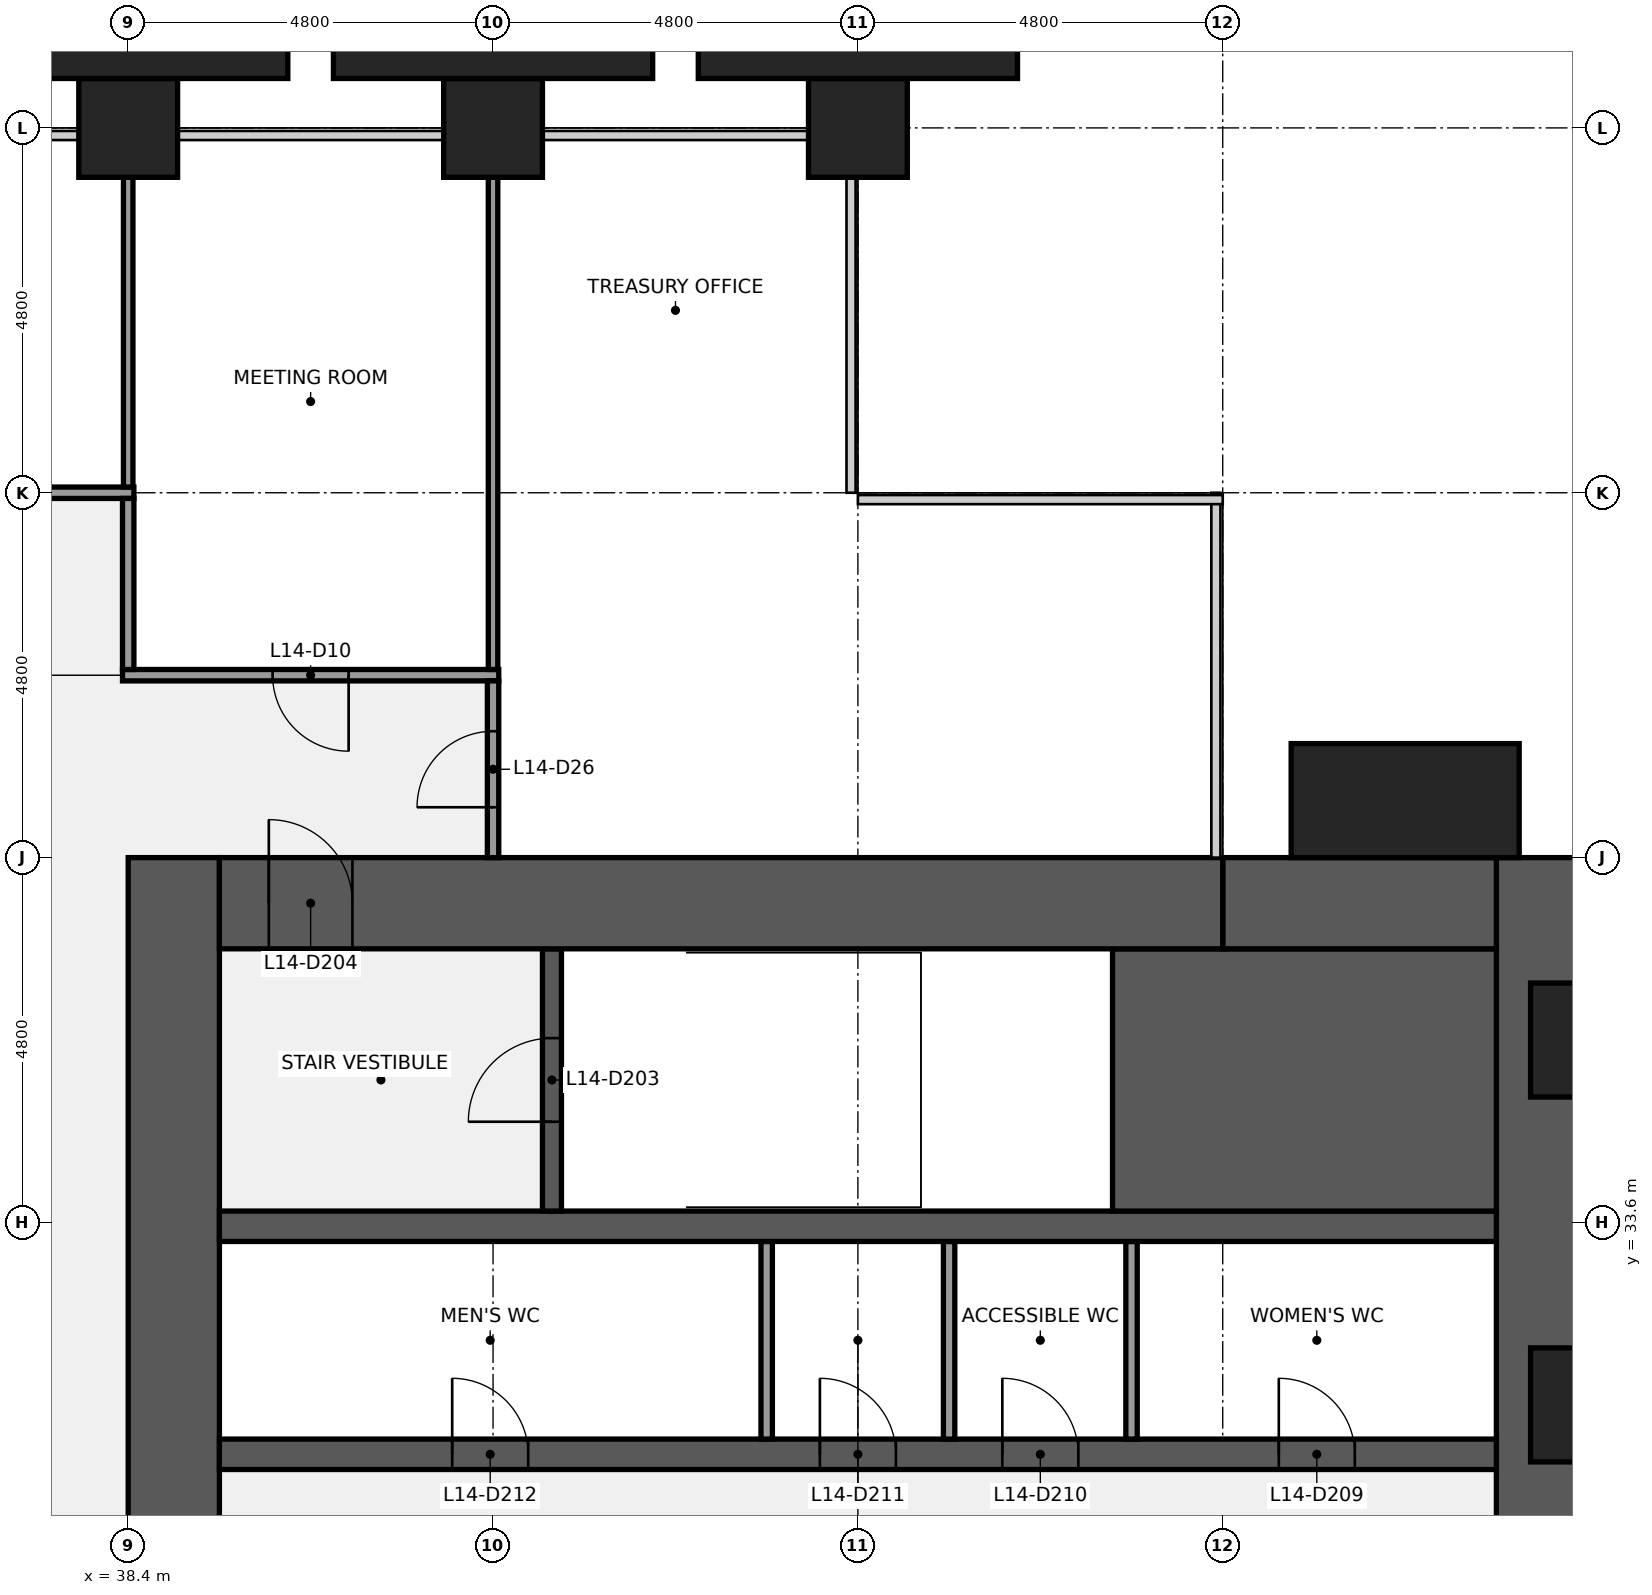
"""IFC4 building model, lengths in metres.
Left out: names, types, materials, properties, quantities, classifications, styles, units other than length and angle.
Written with IfcOpenShell. Run it as: python <this file> out.ifc"""

import sys

from ifc_helpers import new_model, si_unit, direction, frame, frame_2d, origin, origin_2d, place, context, subcontext, project, spatial, rectangle, extrude, element, fill, save


model = new_model("IFC4")
c1 = context("Model", 3, precision=1e-05, world=origin(), true_north=direction((0.0, 1.0)))
c2 = subcontext(c1, "Body", "Model", "MODEL_VIEW")
j1 = project(units=[si_unit("LENGTHUNIT", "METRE"), si_unit("PLANEANGLEUNIT", "RADIAN")], contexts=[c1])
p1 = place(None, origin())
s1 = spatial("IfcSite", under=j1, at=p1, CompositionType="ELEMENT")
p2 = place(p1, origin())
s2 = spatial("IfcBuilding", under=s1, at=p2, CompositionType="ELEMENT")
p3 = place(p2, frame((0.0, 0.0, 67.0)))
s3 = spatial("IfcBuildingStorey", under=s2, at=p3, CompositionType="ELEMENT", Elevation=67.0)
for number, where, z_axis, x_axis in (
    (1, (38.4, 48.0, 0.0), (0.0, 0.0, 1.0), (1.0, 0.0, 0.0)),
    (2, (43.2, 48.0, 0.0), (0.0, 0.0, 1.0), (1.0, 0.0, 0.0)),
    (3, (48.0, 48.0, 0.0), (0.0, 0.0, 1.0), (1.0, 0.0, 0.0)),
):
    element("IfcColumn", number, at=place(p3, frame(where, z_axis=z_axis, x_axis=x_axis)), inside=s3, PredefinedType="COLUMN", context=c2, shape_type="SweptSolid", body=[
        extrude(rectangle(XDim=1.3, YDim=1.3, at=origin_2d()), origin(), (0.0, 0.0, 1.0), 4.0),
    ])
p4 = place(p3, frame((57.0, 38.4, 0.0), z_axis=(0.0, 0.0, 1.0), x_axis=(0.0, -1.0, 0.0)))
e4 = element("IfcWall", 4, at=p4, inside=s3, PredefinedType="SHEAR", context=c2, shape_type="SweptSolid", body=[
    extrude(rectangle(XDim=28.8, YDim=1.2, at=frame_2d((14.4, 0.0))), origin(), (0.0, 0.0, 1.0), 3.84),
])
p5 = place(p4, frame((18.45, 0.0, 0.9)))
e5 = element("IfcOpeningElement", 5, at=p5, cuts=e4, PredefinedType="OPENING", context=c2, shape_type="SweptSolid", body=[
    extrude(rectangle(XDim=1.5, YDim=1.5, at=frame_2d((0.75, 0.75))), frame((0.0, 0.61, 0.0), z_axis=(0.0, -1.0, 0.0), x_axis=(1.0, 0.0, 0.0)), (0.0, 0.0, 1.0), 1.22),
])
p6 = place(p4, frame((8.85, 0.0, 0.9)))
e6 = element("IfcOpeningElement", 6, at=p6, cuts=e4, PredefinedType="OPENING", context=c2, shape_type="SweptSolid", body=[
    extrude(rectangle(XDim=1.5, YDim=1.5, at=frame_2d((0.75, 0.75))), frame((0.0, 0.61, 0.0), z_axis=(0.0, -1.0, 0.0), x_axis=(1.0, 0.0, 0.0)), (0.0, 0.0, 1.0), 1.22),
])
p7 = place(p3, frame((39.0, 9.6, 0.0), z_axis=(0.0, 0.0, 1.0), x_axis=(0.0, 1.0, 0.0)))
e7 = element("IfcWall", 7, at=p7, inside=s3, PredefinedType="SHEAR", context=c2, shape_type="SweptSolid", body=[
    extrude(rectangle(XDim=28.8, YDim=1.2, at=frame_2d((14.4, 0.0))), origin(), (0.0, 0.0, 1.0), 3.84),
])
p8 = place(p7, frame((8.7, 0.0, 0.0)))
e8 = element("IfcOpeningElement", 8, at=p8, cuts=e7, PredefinedType="OPENING", context=c2, shape_type="SweptSolid", body=[
    extrude(rectangle(XDim=1.8, YDim=2.1, at=frame_2d((0.9, 1.05))), frame((0.0, 0.61, 0.0), z_axis=(0.0, -1.0, 0.0), x_axis=(1.0, 0.0, 0.0)), (0.0, 0.0, 1.0), 1.22),
])
p9 = place(p7, frame((18.3, 0.0, 0.0)))
e9 = element("IfcOpeningElement", 9, at=p9, cuts=e7, PredefinedType="OPENING", context=c2, shape_type="SweptSolid", body=[
    extrude(rectangle(XDim=1.8, YDim=2.1, at=frame_2d((0.9, 1.05))), frame((0.0, 0.61, 0.0), z_axis=(0.0, -1.0, 0.0), x_axis=(1.0, 0.0, 0.0)), (0.0, 0.0, 1.0), 1.22),
])
p10 = place(p3, frame((39.6, 30.55, 0.0), z_axis=(0.0, 0.0, 1.0), x_axis=(1.0, 0.0, 0.0)))
e10 = element("IfcWall", 10, at=p10, inside=s3, PredefinedType="SHEAR", context=c2, shape_type="SweptSolid", body=[
    extrude(rectangle(XDim=16.8, YDim=0.4, at=frame_2d((8.4, 0.0))), origin(), (0.0, 0.0, 1.0), 3.84),
])
p11 = place(p10, frame((13.938, 0.0, 0.0)))
e11 = element("IfcOpeningElement", 11, at=p11, cuts=e10, PredefinedType="OPENING", context=c2, shape_type="SweptSolid", body=[
    extrude(rectangle(XDim=1.0, YDim=2.1, at=frame_2d((0.5, 1.05))), frame((0.0, 0.21, 0.0), z_axis=(0.0, -1.0, 0.0), x_axis=(1.0, 0.0, 0.0)), (0.0, 0.0, 1.0), 0.42),
])
p12 = place(p10, frame((10.3, 0.0, 0.0)))
e12 = element("IfcOpeningElement", 12, at=p12, cuts=e10, PredefinedType="OPENING", context=c2, shape_type="SweptSolid", body=[
    extrude(rectangle(XDim=1.0, YDim=2.1, at=frame_2d((0.5, 1.05))), frame((0.0, 0.21, 0.0), z_axis=(0.0, -1.0, 0.0), x_axis=(1.0, 0.0, 0.0)), (0.0, 0.0, 1.0), 0.42),
])
p13 = place(p10, frame((7.9, 0.0, 0.0)))
e13 = element("IfcOpeningElement", 13, at=p13, cuts=e10, PredefinedType="OPENING", context=c2, shape_type="SweptSolid", body=[
    extrude(rectangle(XDim=1.0, YDim=2.1, at=frame_2d((0.5, 1.05))), frame((0.0, 0.21, 0.0), z_axis=(0.0, -1.0, 0.0), x_axis=(1.0, 0.0, 0.0)), (0.0, 0.0, 1.0), 0.42),
])
p14 = place(p10, frame((3.062, 0.0, 0.0)))
e14 = element("IfcOpeningElement", 14, at=p14, cuts=e10, PredefinedType="OPENING", context=c2, shape_type="SweptSolid", body=[
    extrude(rectangle(XDim=1.0, YDim=2.1, at=frame_2d((0.5, 1.05))), frame((0.0, 0.21, 0.0), z_axis=(0.0, -1.0, 0.0), x_axis=(1.0, 0.0, 0.0)), (0.0, 0.0, 1.0), 0.42),
])
for number, where, z_axis, x_axis in (
    (15, (51.6, 30.75, 0.0), (0.0, 0.0, 1.0), (0.0, 1.0, 0.0)),
    (16, (49.2, 30.75, 0.0), (0.0, 0.0, 1.0), (0.0, 1.0, 0.0)),
    (17, (46.8, 30.75, 0.0), (0.0, 0.0, 1.0), (0.0, 1.0, 0.0)),
):
    element("IfcWall", number, at=place(p3, frame(where, z_axis=z_axis, x_axis=x_axis)), inside=s3, PredefinedType="PARTITIONING", context=c2, shape_type="SweptSolid", body=[
        extrude(rectangle(XDim=2.6, YDim=0.15, at=frame_2d((1.3, 0.0))), origin(), (0.0, 0.0, 1.0), 3.84),
    ])
p15 = place(p3, frame((39.6, 33.55, 0.0), z_axis=(0.0, 0.0, 1.0), x_axis=(1.0, 0.0, 0.0)))
e18 = element("IfcWall", 18, at=p15, inside=s3, PredefinedType="SHEAR", context=c2, shape_type="SweptSolid", body=[
    extrude(rectangle(XDim=16.8, YDim=0.4, at=frame_2d((8.4, 0.0))), origin(), (0.0, 0.0, 1.0), 3.84),
])
p16 = place(p3, frame((51.35, 35.475, 0.0), z_axis=(0.0, 0.0, 1.0), x_axis=(1.0, 0.0, 0.0)))
e19 = element("IfcWall", 19, at=p16, inside=s3, PredefinedType="SHEAR", context=c2, shape_type="SweptSolid", body=[
    extrude(rectangle(XDim=5.05, YDim=3.45, at=frame_2d((2.525, 0.0))), origin(), (0.0, 0.0, 1.0), 3.84),
])
p17 = place(p3, frame((43.975, 33.75, 0.0), z_axis=(0.0, 0.0, 1.0), x_axis=(0.0, 1.0, 0.0)))
e20 = element("IfcWall", 20, at=p17, inside=s3, PredefinedType="SHEAR", context=c2, shape_type="SweptSolid", body=[
    extrude(rectangle(XDim=3.45, YDim=0.25, at=frame_2d((1.725, 0.0))), origin(), (0.0, 0.0, 1.0), 3.84),
])
p18 = place(p17, frame((1.175, 0.0, 0.0)))
e21 = element("IfcOpeningElement", 21, at=p18, cuts=e20, PredefinedType="OPENING", context=c2, shape_type="SweptSolid", body=[
    extrude(rectangle(XDim=1.1, YDim=2.1, at=frame_2d((0.55, 1.05))), frame((0.0, 0.135, 0.0), z_axis=(0.0, -1.0, 0.0), x_axis=(1.0, 0.0, 0.0)), (0.0, 0.0, 1.0), 0.27),
])
p19 = place(p3, frame((52.8, 37.8, 0.0), z_axis=(0.0, 0.0, 1.0), x_axis=(1.0, 0.0, 0.0)))
e22 = element("IfcWall", 22, at=p19, inside=s3, PredefinedType="SHEAR", context=c2, shape_type="SweptSolid", body=[
    extrude(rectangle(XDim=3.6, YDim=1.2, at=frame_2d((1.8, 0.0))), origin(), (0.0, 0.0, 1.0), 3.84),
])
p20 = place(p3, frame((39.6, 37.8, 0.0), z_axis=(0.0, 0.0, 1.0), x_axis=(1.0, 0.0, 0.0)))
e23 = element("IfcWall", 23, at=p20, inside=s3, PredefinedType="SHEAR", context=c2, shape_type="SweptSolid", body=[
    extrude(rectangle(XDim=13.2, YDim=1.2, at=frame_2d((6.6, 0.0))), origin(), (0.0, 0.0, 1.0), 3.84),
])
p21 = place(p20, frame((0.65, 0.0, 0.0)))
e24 = element("IfcOpeningElement", 24, at=p21, cuts=e23, PredefinedType="OPENING", context=c2, shape_type="SweptSolid", body=[
    extrude(rectangle(XDim=1.1, YDim=2.1, at=frame_2d((0.55, 1.05))), frame((0.0, 0.61, 0.0), z_axis=(0.0, -1.0, 0.0), x_axis=(1.0, 0.0, 0.0)), (0.0, 0.0, 1.0), 1.22),
])
p22 = place(p3, frame((38.325, 40.8, 0.0), z_axis=(0.0, 0.0, 1.0), x_axis=(1.0, 0.0, 0.0)))
e25 = element("IfcWall", 25, at=p22, inside=s3, PredefinedType="PARTITIONING", context=c2, shape_type="SweptSolid", body=[
    extrude(rectangle(XDim=4.95, YDim=0.15, at=frame_2d((2.475, 0.0))), origin(), (0.0, 0.0, 1.0), 2.849),
])
p23 = place(p22, frame((1.975, 0.0, 0.0)))
e26 = element("IfcOpeningElement", 26, at=p23, cuts=e25, PredefinedType="OPENING", context=c2, shape_type="SweptSolid", body=[
    extrude(rectangle(XDim=1.0, YDim=2.1, at=frame_2d((0.5, 1.05))), frame((0.0, 0.085, 0.0), z_axis=(0.0, -1.0, 0.0), x_axis=(1.0, 0.0, 0.0)), (0.0, 0.0, 1.0), 0.17),
])
p24 = place(p3, frame((19.125, 43.2, 0.0), z_axis=(0.0, 0.0, 1.0), x_axis=(1.0, 0.0, 0.0)))
e27 = element("IfcWall", 27, at=p24, inside=s3, PredefinedType="PARTITIONING", context=c2, shape_type="SweptSolid", body=[
    extrude(rectangle(XDim=19.35, YDim=0.15, at=frame_2d((9.675, 0.0))), origin(), (0.0, 0.0, 1.0), 2.849),
])
p25 = place(p24, frame((0.775, 0.0, 0.0)))
e28 = element("IfcOpeningElement", 28, at=p25, cuts=e27, PredefinedType="OPENING", context=c2, shape_type="SweptSolid", body=[
    extrude(rectangle(XDim=1.0, YDim=2.1, at=frame_2d((0.5, 1.05))), frame((0.0, 0.085, 0.0), z_axis=(0.0, -1.0, 0.0), x_axis=(1.0, 0.0, 0.0)), (0.0, 0.0, 1.0), 0.17),
])
p26 = place(p24, frame((3.175, 0.0, 0.0)))
e29 = element("IfcOpeningElement", 29, at=p26, cuts=e27, PredefinedType="OPENING", context=c2, shape_type="SweptSolid", body=[
    extrude(rectangle(XDim=1.0, YDim=2.1, at=frame_2d((0.5, 1.05))), frame((0.0, 0.085, 0.0), z_axis=(0.0, -1.0, 0.0), x_axis=(1.0, 0.0, 0.0)), (0.0, 0.0, 1.0), 0.17),
])
p27 = place(p24, frame((9.175, 0.0, 0.0)))
e30 = element("IfcOpeningElement", 30, at=p27, cuts=e27, PredefinedType="OPENING", context=c2, shape_type="SweptSolid", body=[
    extrude(rectangle(XDim=1.0, YDim=2.1, at=frame_2d((0.5, 1.05))), frame((0.0, 0.085, 0.0), z_axis=(0.0, -1.0, 0.0), x_axis=(1.0, 0.0, 0.0)), (0.0, 0.0, 1.0), 0.17),
])
p28 = place(p24, frame((16.375, 0.0, 0.0)))
e31 = element("IfcOpeningElement", 31, at=p28, cuts=e27, PredefinedType="OPENING", context=c2, shape_type="SweptSolid", body=[
    extrude(rectangle(XDim=1.0, YDim=2.1, at=frame_2d((0.5, 1.05))), frame((0.0, 0.085, 0.0), z_axis=(0.0, -1.0, 0.0), x_axis=(1.0, 0.0, 0.0)), (0.0, 0.0, 1.0), 0.17),
])
p29 = place(p3, frame((38.4, 43.275, 0.0), z_axis=(0.0, 0.0, 1.0), x_axis=(0.0, 1.0, 0.0)))
e32 = element("IfcWall", 32, at=p29, inside=s3, PredefinedType="PARTITIONING", context=c2, shape_type="SweptSolid", body=[
    extrude(rectangle(XDim=4.075, YDim=0.125, at=frame_2d((2.038, 0.0))), origin(), (0.0, 0.0, 1.0), 2.849),
])
p30 = place(p3, frame((38.4, 40.875, 0.0), z_axis=(0.0, 0.0, 1.0), x_axis=(0.0, 1.0, 0.0)))
e33 = element("IfcWall", 33, at=p30, inside=s3, PredefinedType="PARTITIONING", context=c2, shape_type="SweptSolid", body=[
    extrude(rectangle(XDim=2.25, YDim=0.15, at=frame_2d((1.125, 0.0))), origin(), (0.0, 0.0, 1.0), 2.849),
])
p31 = place(p3, frame((43.2, 40.875, 0.0), z_axis=(0.0, 0.0, 1.0), x_axis=(0.0, 1.0, 0.0)))
e34 = element("IfcWall", 34, at=p31, inside=s3, PredefinedType="PARTITIONING", context=c2, shape_type="SweptSolid", body=[
    extrude(rectangle(XDim=6.475, YDim=0.125, at=frame_2d((3.238, 0.0))), origin(), (0.0, 0.0, 1.0), 2.849),
])
p32 = place(p3, frame((43.2, 38.4, 0.0), z_axis=(0.0, 0.0, 1.0), x_axis=(0.0, 1.0, 0.0)))
e35 = element("IfcWall", 35, at=p32, inside=s3, PredefinedType="PARTITIONING", context=c2, shape_type="SweptSolid", body=[
    extrude(rectangle(XDim=2.325, YDim=0.15, at=frame_2d((1.163, 0.0))), origin(), (0.0, 0.0, 1.0), 2.849),
])
p33 = place(p32, frame((0.663, 0.0, 0.0)))
e36 = element("IfcOpeningElement", 36, at=p33, cuts=e35, PredefinedType="OPENING", context=c2, shape_type="SweptSolid", body=[
    extrude(rectangle(XDim=1.0, YDim=2.1, at=frame_2d((0.5, 1.05))), frame((0.0, 0.085, 0.0), z_axis=(0.0, -1.0, 0.0), x_axis=(1.0, 0.0, 0.0)), (0.0, 0.0, 1.0), 0.17),
])
p34 = place(p3, frame((55.2, 39.15, 0.0), z_axis=(0.0, 0.0, 1.0), x_axis=(1.0, 0.0, 0.0)))
e37 = element("IfcColumn", 37, at=p34, inside=s3, PredefinedType="PILASTER", context=c2, shape_type="SweptSolid", body=[
    extrude(rectangle(XDim=3.0, YDim=1.5, at=origin_2d()), origin(), (0.0, 0.0, 1.0), 4.0),
])
for number, where, z_axis, x_axis in (
    (38, (38.4, 49.075, 0.0), (0.0, 0.0, 1.0), (1.0, 0.0, 0.0)),
    (39, (43.2, 49.075, 0.0), (0.0, 0.0, 1.0), (1.0, 0.0, 0.0)),
    (40, (48.0, 49.075, 0.0), (0.0, 0.0, 1.0), (1.0, 0.0, 0.0)),
):
    element("IfcColumn", number, at=place(p3, frame(where, z_axis=z_axis, x_axis=x_axis)), inside=s3, PredefinedType="PILASTER", context=c2, shape_type="SweptSolid", body=[
        extrude(rectangle(XDim=4.2, YDim=0.85, at=origin_2d()), origin(), (0.0, 0.0, 1.0), 4.0),
    ])
p35 = place(p18, origin())
e41 = element("IfcDoor", 41, at=p35, inside=s3, OperationType="SINGLE_SWING_LEFT", PredefinedType="DOOR", context=c2, shape_type="SweptSolid", body=[
    extrude(rectangle(XDim=1.1, YDim=2.1, at=frame_2d((0.55, 1.05))), frame((0.0, 0.025, 0.0), z_axis=(0.0, -1.0, 0.0), x_axis=(1.0, 0.0, 0.0)), (0.0, 0.0, 1.0), 0.05),
])
fill(e21, e41)
p36 = place(p21, origin())
e42 = element("IfcDoor", 42, at=p36, inside=s3, OperationType="SINGLE_SWING_LEFT", PredefinedType="DOOR", context=c2, shape_type="SweptSolid", body=[
    extrude(rectangle(XDim=1.1, YDim=2.1, at=frame_2d((0.55, 1.05))), frame((0.0, 0.025, 0.0), z_axis=(0.0, -1.0, 0.0), x_axis=(1.0, 0.0, 0.0)), (0.0, 0.0, 1.0), 0.05),
])
fill(e24, e42)
p37 = place(p11, origin())
e43 = element("IfcDoor", 43, at=p37, inside=s3, OperationType="SINGLE_SWING_LEFT", PredefinedType="DOOR", context=c2, shape_type="SweptSolid", body=[
    extrude(rectangle(XDim=1.0, YDim=2.1, at=frame_2d((0.5, 1.05))), frame((0.0, 0.025, 0.0), z_axis=(0.0, -1.0, 0.0), x_axis=(1.0, 0.0, 0.0)), (0.0, 0.0, 1.0), 0.05),
])
fill(e11, e43)
p38 = place(p12, origin())
e44 = element("IfcDoor", 44, at=p38, inside=s3, OperationType="SINGLE_SWING_LEFT", PredefinedType="DOOR", context=c2, shape_type="SweptSolid", body=[
    extrude(rectangle(XDim=1.0, YDim=2.1, at=frame_2d((0.5, 1.05))), frame((0.0, 0.025, 0.0), z_axis=(0.0, -1.0, 0.0), x_axis=(1.0, 0.0, 0.0)), (0.0, 0.0, 1.0), 0.05),
])
fill(e12, e44)
p39 = place(p13, origin())
e45 = element("IfcDoor", 45, at=p39, inside=s3, OperationType="SINGLE_SWING_LEFT", PredefinedType="DOOR", context=c2, shape_type="SweptSolid", body=[
    extrude(rectangle(XDim=1.0, YDim=2.1, at=frame_2d((0.5, 1.05))), frame((0.0, 0.025, 0.0), z_axis=(0.0, -1.0, 0.0), x_axis=(1.0, 0.0, 0.0)), (0.0, 0.0, 1.0), 0.05),
])
fill(e13, e45)
p40 = place(p14, origin())
e46 = element("IfcDoor", 46, at=p40, inside=s3, OperationType="SINGLE_SWING_LEFT", PredefinedType="DOOR", context=c2, shape_type="SweptSolid", body=[
    extrude(rectangle(XDim=1.0, YDim=2.1, at=frame_2d((0.5, 1.05))), frame((0.0, 0.025, 0.0), z_axis=(0.0, -1.0, 0.0), x_axis=(1.0, 0.0, 0.0)), (0.0, 0.0, 1.0), 0.05),
])
fill(e14, e46)
p41 = place(p23, origin())
e47 = element("IfcDoor", 47, at=p41, inside=s3, OperationType="SINGLE_SWING_RIGHT", PredefinedType="DOOR", context=c2, shape_type="SweptSolid", body=[
    extrude(rectangle(XDim=1.0, YDim=2.1, at=frame_2d((0.5, 1.05))), frame((0.0, 0.025, 0.0), z_axis=(0.0, -1.0, 0.0), x_axis=(1.0, 0.0, 0.0)), (0.0, 0.0, 1.0), 0.05),
])
fill(e26, e47)
p42 = place(p33, origin())
e48 = element("IfcDoor", 48, at=p42, inside=s3, OperationType="SINGLE_SWING_LEFT", PredefinedType="DOOR", context=c2, shape_type="SweptSolid", body=[
    extrude(rectangle(XDim=1.0, YDim=2.1, at=frame_2d((0.5, 1.05))), frame((0.0, 0.025, 0.0), z_axis=(0.0, -1.0, 0.0), x_axis=(1.0, 0.0, 0.0)), (0.0, 0.0, 1.0), 0.05),
])
fill(e36, e48)
save(model, sys.argv[1])
